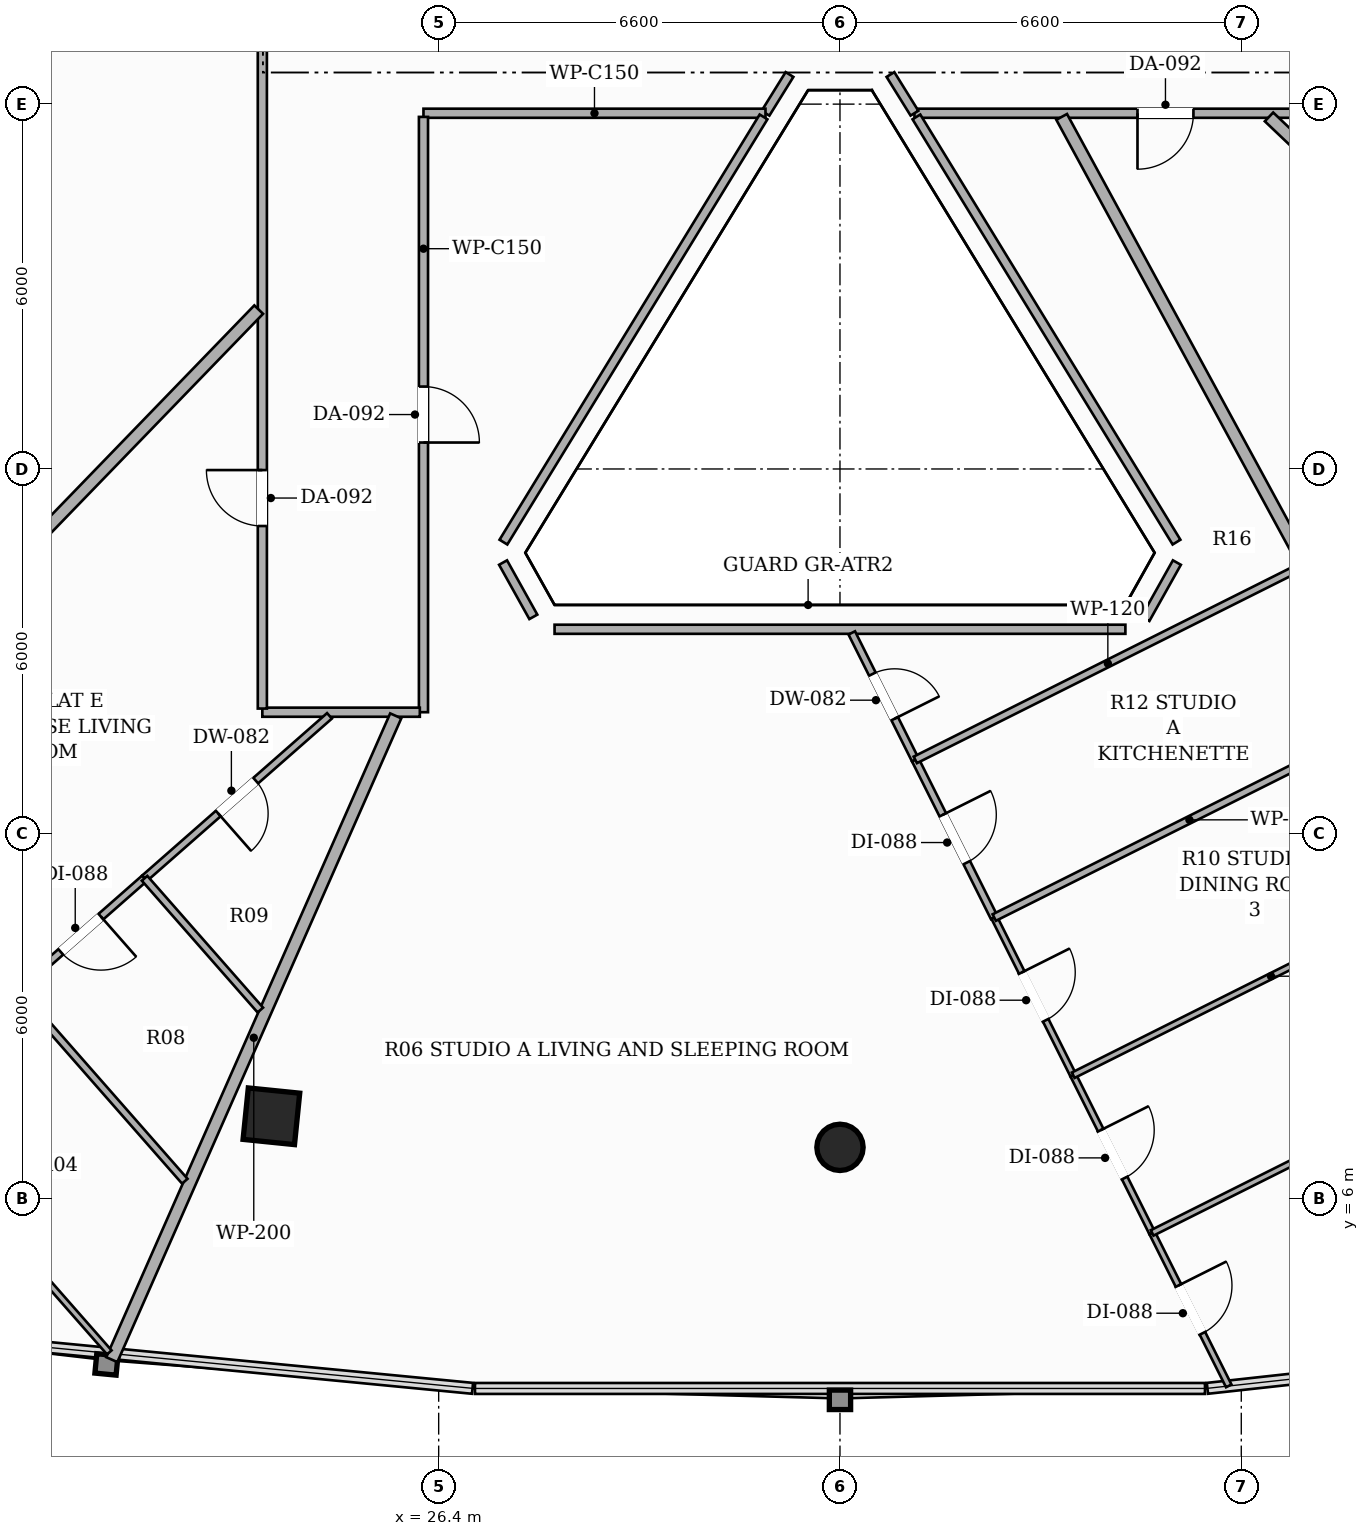
"""IFC4 building model, lengths in metres.
Left out: names, types, materials, properties, quantities, classifications, styles, units other than length and angle.
Written with IfcOpenShell. Run it as: python <this file> out.ifc"""

import sys

from ifc_helpers import new_model, si_unit, direction, frame, frame_2d, origin, origin_2d, place, context, subcontext, project, spatial, rectangle, hollow_rectangle, hollow_circle, extrude, element, fill, save


model = new_model("IFC4")
c1 = context("Model", 3, precision=1e-05, world=origin(), true_north=direction((0.0, 1.0)))
c2 = subcontext(c1, "Body", "Model", "MODEL_VIEW")
j1 = project(units=[si_unit("LENGTHUNIT", "METRE"), si_unit("PLANEANGLEUNIT", "RADIAN")], contexts=[c1])
p1 = place(None, origin())
s1 = spatial("IfcSite", under=j1, at=p1, CompositionType="ELEMENT")
p2 = place(p1, origin())
s2 = spatial("IfcBuilding", under=s1, at=p2, CompositionType="ELEMENT")
p3 = place(p2, frame((0.0, 0.0, 110.0)))
s3 = spatial("IfcBuildingStorey", under=s2, at=p3, CompositionType="ELEMENT", Elevation=110.0)
p4 = place(p3, frame((23.649, 7.355, 0.0), z_axis=(0.0, 0.0, 1.0), x_axis=(-0.994880708829, 0.101056297183, 0.0)))
e1 = element("IfcColumn", 1, at=p4, inside=s3, PredefinedType="COLUMN", context=c2, shape_type="SweptSolid", body=[
    extrude(hollow_rectangle(XDim=0.85, YDim=0.85, WallThickness=0.028, at=origin_2d()), origin(), (0.0, 0.0, 1.0), 3.3),
])
p5 = place(p3, frame((33.0, 6.844, 0.0), z_axis=(0.0, 0.0, 1.0), x_axis=(1.0, 0.0, 0.0)))
e2 = element("IfcColumn", 2, at=p5, inside=s3, PredefinedType="COLUMN", context=c2, shape_type="SweptSolid", body=[
    extrude(hollow_circle(Radius=0.381, WallThickness=0.022, at=origin_2d()), origin(), (0.0, 0.0, 1.0), 3.3),
])
p6 = place(p3, frame((20.095, 34.718, 0.0), z_axis=(0.0, 0.0, 1.0), x_axis=(-0.514362369366, -0.857572943242, 0.0)))
e3 = element("IfcWall", 3, at=p6, inside=s3, PredefinedType="SOLIDWALL", context=c2, shape_type="SweptSolid", body=[
    extrude(rectangle(XDim=11.844, YDim=0.24, at=frame_2d((5.922, 0.0))), origin(), (0.0, 0.0, 1.0), 2.624),
])
p7 = place(p6, frame((9.346, 0.0, 0.0)))
e4 = element("IfcOpeningElement", 4, at=p7, cuts=e3, PredefinedType="OPENING", context=c2, shape_type="SweptSolid", body=[
    extrude(rectangle(XDim=1.8, YDim=2.2, at=frame_2d((0.9, 1.1))), frame((0.0, 0.13, 0.0), z_axis=(0.0, -1.0, 0.0), x_axis=(1.0, 0.0, 0.0)), (0.0, 0.0, 1.0), 0.26),
])
p8 = place(p3, frame((32.17, 24.487, 0.0), z_axis=(0.0, 0.0, 1.0), x_axis=(-0.527038486816, -0.849841416627, 0.0)))
e5 = element("IfcWall", 5, at=p8, inside=s3, PredefinedType="PARTITIONING", context=c2, shape_type="SweptSolid", body=[
    extrude(rectangle(XDim=0.75, YDim=0.15, at=frame_2d((0.375, 0.0))), origin(), (0.0, 0.0, 1.0), 3.06),
])
p9 = place(p3, frame((31.775, 23.85, 0.0), z_axis=(0.0, 0.0, 1.0), x_axis=(-1.0, 0.0, 0.0)))
e6 = element("IfcWall", 6, at=p9, inside=s3, PredefinedType="PARTITIONING", context=c2, shape_type="SweptSolid", body=[
    extrude(rectangle(XDim=5.625, YDim=0.15, at=frame_2d((2.812, 0.0))), origin(), (0.0, 0.0, 1.0), 2.721),
])
p10 = place(p3, frame((26.15, 23.79, 0.0), z_axis=(0.0, 0.0, 1.0), x_axis=(0.0, -1.0, 0.0)))
e7 = element("IfcWall", 7, at=p10, inside=s3, PredefinedType="PARTITIONING", context=c2, shape_type="SweptSolid", body=[
    extrude(rectangle(XDim=9.79, YDim=0.15, at=frame_2d((4.895, 0.0))), origin(), (0.0, 0.0, 1.0), 2.721),
])
p11 = place(p10, frame((4.435, 0.0, 0.0)))
e8 = element("IfcOpeningElement", 8, at=p11, cuts=e7, PredefinedType="OPENING", context=c2, shape_type="SweptSolid", body=[
    extrude(rectangle(XDim=0.92, YDim=2.15, at=frame_2d((0.46, 1.075))), frame((0.0, 0.085, 0.0), z_axis=(0.0, -1.0, 0.0), x_axis=(1.0, 0.0, 0.0)), (0.0, 0.0, 1.0), 0.17),
])
p12 = place(p3, frame((26.09, 14.0, 0.0), z_axis=(0.0, 0.0, 1.0), x_axis=(-1.0, 0.0, 0.0)))
e9 = element("IfcWall", 9, at=p12, inside=s3, PredefinedType="PARTITIONING", context=c2, shape_type="SweptSolid", body=[
    extrude(rectangle(XDim=2.59, YDim=0.15, at=frame_2d((1.295, 0.0))), origin(), (0.0, 0.0, 1.0), 2.721),
])
p13 = place(p3, frame((23.5, 14.06, 0.0), z_axis=(0.0, 0.0, 1.0), x_axis=(0.0, 1.0, 0.0)))
e10 = element("IfcWall", 10, at=p13, inside=s3, PredefinedType="PARTITIONING", context=c2, shape_type="SweptSolid", body=[
    extrude(rectangle(XDim=22.84, YDim=0.15, at=frame_2d((11.42, 0.0))), origin(), (0.0, 0.0, 1.0), 2.413),
])
p14 = place(p13, frame((13.373, 0.0, 0.0)))
e11 = element("IfcOpeningElement", 11, at=p14, cuts=e10, PredefinedType="OPENING", context=c2, shape_type="SweptSolid", body=[
    extrude(rectangle(XDim=0.88, YDim=2.1, at=frame_2d((0.44, 1.05))), frame((0.0, 0.085, 0.0), z_axis=(0.0, -1.0, 0.0), x_axis=(1.0, 0.0, 0.0)), (0.0, 0.0, 1.0), 0.17),
])
p15 = place(p13, frame((3.002, 0.0, 0.0)))
e12 = element("IfcOpeningElement", 12, at=p15, cuts=e10, PredefinedType="OPENING", context=c2, shape_type="SweptSolid", body=[
    extrude(rectangle(XDim=0.92, YDim=2.15, at=frame_2d((0.46, 1.075))), frame((0.0, 0.085, 0.0), z_axis=(0.0, -1.0, 0.0), x_axis=(1.0, 0.0, 0.0)), (0.0, 0.0, 1.0), 0.17),
])
p16 = place(p3, frame((42.29, 23.85, 0.0), z_axis=(0.0, 0.0, 1.0), x_axis=(-1.0, 0.0, 0.0)))
e13 = element("IfcWall", 13, at=p16, inside=s3, PredefinedType="PARTITIONING", context=c2, shape_type="SweptSolid", body=[
    extrude(rectangle(XDim=8.065, YDim=0.15, at=frame_2d((4.032, 0.0))), origin(), (0.0, 0.0, 1.0), 2.492),
])
p17 = place(p16, frame((3.477, 0.0, 0.0)))
e14 = element("IfcOpeningElement", 14, at=p17, cuts=e13, PredefinedType="OPENING", context=c2, shape_type="SweptSolid", body=[
    extrude(rectangle(XDim=0.92, YDim=2.15, at=frame_2d((0.46, 1.075))), frame((0.0, 0.085, 0.0), z_axis=(0.0, -1.0, 0.0), x_axis=(1.0, 0.0, 0.0)), (0.0, 0.0, 1.0), 0.17),
])
p18 = place(p16, frame((0.14, 0.0, 0.0)))
e15 = element("IfcOpeningElement", 15, at=p18, cuts=e13, PredefinedType="OPENING", context=c2, shape_type="SweptSolid", body=[
    extrude(rectangle(XDim=0.88, YDim=2.1, at=frame_2d((0.44, 1.05))), frame((0.0, 0.085, 0.0), z_axis=(0.0, -1.0, 0.0), x_axis=(1.0, 0.0, 0.0)), (0.0, 0.0, 1.0), 0.17),
])
p19 = place(p3, frame((34.225, 23.851, 0.0), z_axis=(0.0, 0.0, 1.0), x_axis=(-0.527622593928, 0.849478898135, 0.0)))
e16 = element("IfcWall", 16, at=p19, inside=s3, PredefinedType="PARTITIONING", context=c2, shape_type="SweptSolid", body=[
    extrude(rectangle(XDim=0.749, YDim=0.15, at=frame_2d((0.375, 0.0))), origin(), (0.0, 0.0, 1.0), 3.06),
])
p20 = place(p3, frame((34.257, 23.79, 0.0), z_axis=(0.0, 0.0, 1.0), x_axis=(0.521839061235, -0.853043957935, 0.0)))
e17 = element("IfcWall", 17, at=p20, inside=s3, PredefinedType="PARTITIONING", context=c2, shape_type="SweptSolid", body=[
    extrude(rectangle(XDim=8.198, YDim=0.15, at=frame_2d((4.099, 0.0))), origin(), (0.0, 0.0, 1.0), 2.721),
])
p21 = place(p3, frame((38.541, 16.461, 0.0), z_axis=(0.0, 0.0, 1.0), x_axis=(-0.488631416095, -0.872490308946, 0.0)))
e18 = element("IfcWall", 18, at=p21, inside=s3, PredefinedType="PARTITIONING", context=c2, shape_type="SweptSolid", body=[
    extrude(rectangle(XDim=1.06, YDim=0.15, at=frame_2d((0.53, 0.0))), origin(), (0.0, 0.0, 1.0), 3.06),
])
p22 = place(p3, frame((37.694, 15.364, 0.0), z_axis=(0.0, 0.0, 1.0), x_axis=(-1.0, 0.0, 0.0)))
e19 = element("IfcWall", 19, at=p22, inside=s3, PredefinedType="PARTITIONING", context=c2, shape_type="SweptSolid", body=[
    extrude(rectangle(XDim=9.388, YDim=0.15, at=frame_2d((4.694, 0.0))), origin(), (0.0, 0.0, 1.0), 2.721),
])
p23 = place(p3, frame((27.957, 15.568, 0.0), z_axis=(0.0, 0.0, 1.0), x_axis=(-0.487162890713, 0.873311123204, 0.0)))
e20 = element("IfcWall", 20, at=p23, inside=s3, PredefinedType="PARTITIONING", context=c2, shape_type="SweptSolid", body=[
    extrude(rectangle(XDim=1.022, YDim=0.15, at=frame_2d((0.511, 0.0))), origin(), (0.0, 0.0, 1.0), 3.06),
])
p24 = place(p3, frame((27.465, 16.797, 0.0), z_axis=(0.0, 0.0, 1.0), x_axis=(0.521839061235, 0.853043957935, 0.0)))
e21 = element("IfcWall", 21, at=p24, inside=s3, PredefinedType="PARTITIONING", context=c2, shape_type="SweptSolid", body=[
    extrude(rectangle(XDim=8.198, YDim=0.15, at=frame_2d((4.099, 0.0))), origin(), (0.0, 0.0, 1.0), 2.721),
])
p25 = place(p3, frame((36.646, 23.79, 0.0), z_axis=(0.0, 0.0, 1.0), x_axis=(0.477391569207, -0.878690667784, 0.0)))
e22 = element("IfcWall", 22, at=p25, inside=s3, PredefinedType="PARTITIONING", context=c2, shape_type="SweptSolid", body=[
    extrude(rectangle(XDim=22.918, YDim=0.2, at=frame_2d((11.459, 0.0))), origin(), (0.0, 0.0, 1.0), 2.413),
])
p26 = place(p3, frame((21.024, 3.353, 0.0), z_axis=(0.0, 0.0, 1.0), x_axis=(0.403601766718, 0.914934759369, 0.0)))
e23 = element("IfcWall", 23, at=p26, inside=s3, PredefinedType="PARTITIONING", context=c2, shape_type="SweptSolid", body=[
    extrude(rectangle(XDim=11.571, YDim=0.2, at=frame_2d((5.786, 0.0))), origin(), (0.0, 0.0, 1.0), 2.413),
])
p27 = place(p3, frame((23.44, 20.621, 0.0), z_axis=(0.0, 0.0, 1.0), x_axis=(-0.695405261367, -0.718617786075, 0.0)))
e24 = element("IfcWall", 24, at=p27, inside=s3, PredefinedType="PARTITIONING", context=c2, shape_type="SweptSolid", body=[
    extrude(rectangle(XDim=21.635, YDim=0.2, at=frame_2d((10.817, 0.0))), origin(), (0.0, 0.0, 1.0), 2.413),
])
p28 = place(p3, frame((40.056, 23.79, 0.0), z_axis=(0.0, 0.0, 1.0), x_axis=(0.724633427165, -0.68913452695, 0.0)))
e25 = element("IfcWall", 25, at=p28, inside=s3, PredefinedType="PARTITIONING", context=c2, shape_type="SweptSolid", body=[
    extrude(rectangle(XDim=25.921, YDim=0.2, at=frame_2d((12.96, 0.0))), origin(), (0.0, 0.0, 1.0), 2.413),
])
p29 = place(p3, frame((33.194, 15.304, 0.0), z_axis=(0.0, 0.0, 1.0), x_axis=(0.447548179666, -0.894259820677, 0.0)))
e26 = element("IfcWall", 26, at=p29, inside=s3, PredefinedType="PARTITIONING", context=c2, shape_type="SweptSolid", body=[
    extrude(rectangle(XDim=2.335, YDim=0.12, at=frame_2d((1.167, 0.0))), origin(), (0.0, 0.0, 1.0), 2.721),
])
p30 = place(p29, frame((0.757, 0.0, 0.0)))
e27 = element("IfcOpeningElement", 27, at=p30, cuts=e26, PredefinedType="OPENING", context=c2, shape_type="SweptSolid", body=[
    extrude(rectangle(XDim=0.82, YDim=2.1, at=frame_2d((0.41, 1.05))), frame((0.0, 0.07, 0.0), z_axis=(0.0, -1.0, 0.0), x_axis=(1.0, 0.0, 0.0)), (0.0, 0.0, 1.0), 0.14),
])
p31 = place(p3, frame((34.239, 13.216, 0.0), z_axis=(0.0, 0.0, 1.0), x_axis=(0.447651342751, -0.894208183441, 0.0)))
e28 = element("IfcWall", 28, at=p31, inside=s3, PredefinedType="PARTITIONING", context=c2, shape_type="SweptSolid", body=[
    extrude(rectangle(XDim=2.9, YDim=0.12, at=frame_2d((1.45, 0.0))), origin(), (0.0, 0.0, 1.0), 3.06),
])
p32 = place(p31, frame((1.01, 0.0, 0.0)))
e29 = element("IfcOpeningElement", 29, at=p32, cuts=e28, PredefinedType="OPENING", context=c2, shape_type="SweptSolid", body=[
    extrude(rectangle(XDim=0.88, YDim=2.1, at=frame_2d((0.44, 1.05))), frame((0.0, 0.07, 0.0), z_axis=(0.0, -1.0, 0.0), x_axis=(1.0, 0.0, 0.0)), (0.0, 0.0, 1.0), 0.14),
])
p33 = place(p3, frame((38.134, 5.437, 0.0), z_axis=(0.0, 0.0, 1.0), x_axis=(0.447768773835, -0.894149386388, 0.0)))
e30 = element("IfcWall", 30, at=p33, inside=s3, PredefinedType="PARTITIONING", context=c2, shape_type="SweptSolid", body=[
    extrude(rectangle(XDim=2.814, YDim=0.1, at=frame_2d((1.407, 0.0))), origin(), (0.0, 0.0, 1.0), 3.06),
])
p34 = place(p33, frame((0.967, 0.0, 0.0)))
e31 = element("IfcOpeningElement", 31, at=p34, cuts=e30, PredefinedType="OPENING", context=c2, shape_type="SweptSolid", body=[
    extrude(rectangle(XDim=0.88, YDim=2.1, at=frame_2d((0.44, 1.05))), frame((0.0, 0.06, 0.0), z_axis=(0.0, -1.0, 0.0), x_axis=(1.0, 0.0, 0.0)), (0.0, 0.0, 1.0), 0.12),
])
p35 = place(p3, frame((36.836, 8.03, 0.0), z_axis=(0.0, 0.0, 1.0), x_axis=(0.447651342751, -0.894208183441, 0.0)))
e32 = element("IfcWall", 32, at=p35, inside=s3, PredefinedType="PARTITIONING", context=c2, shape_type="SweptSolid", body=[
    extrude(rectangle(XDim=2.9, YDim=0.1, at=frame_2d((1.45, 0.0))), origin(), (0.0, 0.0, 1.0), 2.413),
])
p36 = place(p35, frame((1.01, 0.0, 0.0)))
e33 = element("IfcOpeningElement", 33, at=p36, cuts=e32, PredefinedType="OPENING", context=c2, shape_type="SweptSolid", body=[
    extrude(rectangle(XDim=0.88, YDim=2.1, at=frame_2d((0.44, 1.05))), frame((0.0, 0.06, 0.0), z_axis=(0.0, -1.0, 0.0), x_axis=(1.0, 0.0, 0.0)), (0.0, 0.0, 1.0), 0.12),
])
p37 = place(p3, frame((35.537, 10.623, 0.0), z_axis=(0.0, 0.0, 1.0), x_axis=(0.447853271476, -0.894107066983, 0.0)))
e34 = element("IfcWall", 34, at=p37, inside=s3, PredefinedType="PARTITIONING", context=c2, shape_type="SweptSolid", body=[
    extrude(rectangle(XDim=2.9, YDim=0.1, at=frame_2d((1.45, 0.0))), origin(), (0.0, 0.0, 1.0), 3.06),
])
p38 = place(p37, frame((1.01, 0.0, 0.0)))
e35 = element("IfcOpeningElement", 35, at=p38, cuts=e34, PredefinedType="OPENING", context=c2, shape_type="SweptSolid", body=[
    extrude(rectangle(XDim=0.88, YDim=2.1, at=frame_2d((0.44, 1.05))), frame((0.0, 0.06, 0.0), z_axis=(0.0, -1.0, 0.0), x_axis=(1.0, 0.0, 0.0)), (0.0, 0.0, 1.0), 0.12),
])
p39 = place(p3, frame((40.572, 16.387, 0.0), z_axis=(0.0, 0.0, 1.0), x_axis=(-0.894178861749, -0.447709909653, 0.0)))
e36 = element("IfcWall", 36, at=p39, inside=s3, PredefinedType="PARTITIONING", context=c2, shape_type="SweptSolid", body=[
    extrude(rectangle(XDim=7.083, YDim=0.12, at=frame_2d((3.541, 0.0))), origin(), (0.0, 0.0, 1.0), 2.721),
])
p40 = place(p3, frame((41.957, 13.837, 0.0), z_axis=(0.0, 0.0, 1.0), x_axis=(-0.894209449688, -0.447648813344, 0.0)))
e37 = element("IfcWall", 37, at=p40, inside=s3, PredefinedType="PARTITIONING", context=c2, shape_type="SweptSolid", body=[
    extrude(rectangle(XDim=7.179, YDim=0.12, at=frame_2d((3.59, 0.0))), origin(), (0.0, 0.0, 1.0), 2.721),
])
p41 = place(p3, frame((38.134, 5.437, 0.0), z_axis=(0.0, 0.0, 1.0), x_axis=(0.894182030014, 0.447703581849, 0.0)))
e38 = element("IfcWall", 38, at=p41, inside=s3, PredefinedType="PARTITIONING", context=c2, shape_type="SweptSolid", body=[
    extrude(rectangle(XDim=7.373, YDim=0.1, at=frame_2d((3.687, 0.0))), origin(), (0.0, 0.0, 1.0), 2.413),
])
p42 = place(p3, frame((36.836, 8.03, 0.0), z_axis=(0.0, 0.0, 1.0), x_axis=(0.894205618721, 0.447656465884, 0.0)))
e39 = element("IfcWall", 39, at=p42, inside=s3, PredefinedType="PARTITIONING", context=c2, shape_type="SweptSolid", body=[
    extrude(rectangle(XDim=7.276, YDim=0.1, at=frame_2d((3.638, 0.0))), origin(), (0.0, 0.0, 1.0), 2.721),
])
p43 = place(p3, frame((24.604, 13.94, 0.0), z_axis=(0.0, 0.0, 1.0), x_axis=(-0.751349767919, -0.659904179595, 0.0)))
e40 = element("IfcWall", 40, at=p43, inside=s3, PredefinedType="PARTITIONING", context=c2, shape_type="SweptSolid", body=[
    extrude(rectangle(XDim=4.047, YDim=0.12, at=frame_2d((2.024, 0.0))), origin(), (0.0, 0.0, 1.0), 2.721),
])
p44 = place(p43, frame((1.614, 0.0, 0.0)))
e41 = element("IfcOpeningElement", 41, at=p44, cuts=e40, PredefinedType="OPENING", context=c2, shape_type="SweptSolid", body=[
    extrude(rectangle(XDim=0.82, YDim=2.1, at=frame_2d((0.41, 1.05))), frame((0.0, 0.07, 0.0), z_axis=(0.0, -1.0, 0.0), x_axis=(1.0, 0.0, 0.0)), (0.0, 0.0, 1.0), 0.14),
])
p45 = place(p3, frame((21.563, 11.269, 0.0), z_axis=(0.0, 0.0, 1.0), x_axis=(-0.751138604229, -0.660144527537, 0.0)))
e42 = element("IfcWall", 42, at=p45, inside=s3, PredefinedType="PARTITIONING", context=c2, shape_type="SweptSolid", body=[
    extrude(rectangle(XDim=2.79, YDim=0.12, at=frame_2d((1.395, 0.0))), origin(), (0.0, 0.0, 1.0), 2.721),
])
p46 = place(p45, frame((0.955, 0.0, 0.0)))
e43 = element("IfcOpeningElement", 43, at=p46, cuts=e42, PredefinedType="OPENING", context=c2, shape_type="SweptSolid", body=[
    extrude(rectangle(XDim=0.88, YDim=2.1, at=frame_2d((0.44, 1.05))), frame((0.0, 0.07, 0.0), z_axis=(0.0, -1.0, 0.0), x_axis=(1.0, 0.0, 0.0)), (0.0, 0.0, 1.0), 0.14),
])
p47 = place(p3, frame((23.467, 9.102, 0.0), z_axis=(0.0, 0.0, 1.0), x_axis=(-0.660061062947, 0.751211949573, 0.0)))
e44 = element("IfcWall", 44, at=p47, inside=s3, PredefinedType="PARTITIONING", context=c2, shape_type="SweptSolid", body=[
    extrude(rectangle(XDim=2.885, YDim=0.12, at=frame_2d((1.442, 0.0))), origin(), (0.0, 0.0, 1.0), 2.721),
])
p48 = place(p3, frame((22.225, 6.287, 0.0), z_axis=(0.0, 0.0, 1.0), x_axis=(-0.659946783628, 0.751312347016, 0.0)))
e45 = element("IfcWall", 45, at=p48, inside=s3, PredefinedType="PARTITIONING", context=c2, shape_type="SweptSolid", body=[
    extrude(rectangle(XDim=4.179, YDim=0.12, at=frame_2d((2.09, 0.0))), origin(), (0.0, 0.0, 1.0), 2.413),
])
p49 = place(p3, frame((17.37, 7.586, 0.0), z_axis=(0.0, 0.0, 1.0), x_axis=(0.659851528992, -0.751396007234, 0.0)))
e46 = element("IfcWall", 46, at=p49, inside=s3, PredefinedType="PARTITIONING", context=c2, shape_type="SweptSolid", body=[
    extrude(rectangle(XDim=5.475, YDim=0.1, at=frame_2d((2.738, 0.0))), origin(), (0.0, 0.0, 1.0), 2.413),
])
p50 = place(p11, origin())
e47 = element("IfcDoor", 47, at=p50, inside=s3, OperationType="SINGLE_SWING_RIGHT", PredefinedType="DOOR", context=c2, shape_type="SweptSolid", body=[
    extrude(rectangle(XDim=0.92, YDim=2.15, at=frame_2d((0.46, 1.075))), frame((0.0, 0.025, 0.0), z_axis=(0.0, -1.0, 0.0), x_axis=(1.0, 0.0, 0.0)), (0.0, 0.0, 1.0), 0.05),
])
fill(e8, e47)
p51 = place(p30, origin())
e48 = element("IfcDoor", 48, at=p51, inside=s3, OperationType="SINGLE_SWING_RIGHT", PredefinedType="DOOR", context=c2, shape_type="SweptSolid", body=[
    extrude(rectangle(XDim=0.82, YDim=2.1, at=frame_2d((0.41, 1.05))), frame((0.0, 0.025, 0.0), z_axis=(0.0, -1.0, 0.0), x_axis=(1.0, 0.0, 0.0)), (0.0, 0.0, 1.0), 0.05),
])
fill(e27, e48)
p52 = place(p32, origin())
e49 = element("IfcDoor", 49, at=p52, inside=s3, OperationType="SINGLE_SWING_LEFT", PredefinedType="DOOR", context=c2, shape_type="SweptSolid", body=[
    extrude(rectangle(XDim=0.88, YDim=2.1, at=frame_2d((0.44, 1.05))), frame((0.0, 0.025, 0.0), z_axis=(0.0, -1.0, 0.0), x_axis=(1.0, 0.0, 0.0)), (0.0, 0.0, 1.0), 0.05),
])
fill(e29, e49)
p53 = place(p34, origin())
e50 = element("IfcDoor", 50, at=p53, inside=s3, OperationType="SINGLE_SWING_LEFT", PredefinedType="DOOR", context=c2, shape_type="SweptSolid", body=[
    extrude(rectangle(XDim=0.88, YDim=2.1, at=frame_2d((0.44, 1.05))), frame((0.0, 0.025, 0.0), z_axis=(0.0, -1.0, 0.0), x_axis=(1.0, 0.0, 0.0)), (0.0, 0.0, 1.0), 0.05),
])
fill(e31, e50)
p54 = place(p36, origin())
e51 = element("IfcDoor", 51, at=p54, inside=s3, OperationType="SINGLE_SWING_LEFT", PredefinedType="DOOR", context=c2, shape_type="SweptSolid", body=[
    extrude(rectangle(XDim=0.88, YDim=2.1, at=frame_2d((0.44, 1.05))), frame((0.0, 0.025, 0.0), z_axis=(0.0, -1.0, 0.0), x_axis=(1.0, 0.0, 0.0)), (0.0, 0.0, 1.0), 0.05),
])
fill(e33, e51)
p55 = place(p38, origin())
e52 = element("IfcDoor", 52, at=p55, inside=s3, OperationType="SINGLE_SWING_LEFT", PredefinedType="DOOR", context=c2, shape_type="SweptSolid", body=[
    extrude(rectangle(XDim=0.88, YDim=2.1, at=frame_2d((0.44, 1.05))), frame((0.0, 0.025, 0.0), z_axis=(0.0, -1.0, 0.0), x_axis=(1.0, 0.0, 0.0)), (0.0, 0.0, 1.0), 0.05),
])
fill(e35, e52)
p56 = place(p17, origin())
e53 = element("IfcDoor", 53, at=p56, inside=s3, OperationType="SINGLE_SWING_RIGHT", PredefinedType="DOOR", context=c2, shape_type="SweptSolid", body=[
    extrude(rectangle(XDim=0.92, YDim=2.15, at=frame_2d((0.46, 1.075))), frame((0.0, 0.025, 0.0), z_axis=(0.0, -1.0, 0.0), x_axis=(1.0, 0.0, 0.0)), (0.0, 0.0, 1.0), 0.05),
])
fill(e14, e53)
p57 = place(p15, origin())
e54 = element("IfcDoor", 54, at=p57, inside=s3, OperationType="SINGLE_SWING_RIGHT", PredefinedType="DOOR", context=c2, shape_type="SweptSolid", body=[
    extrude(rectangle(XDim=0.92, YDim=2.15, at=frame_2d((0.46, 1.075))), frame((0.0, 0.025, 0.0), z_axis=(0.0, -1.0, 0.0), x_axis=(1.0, 0.0, 0.0)), (0.0, 0.0, 1.0), 0.05),
])
fill(e12, e54)
p58 = place(p44, origin())
e55 = element("IfcDoor", 55, at=p58, inside=s3, OperationType="SINGLE_SWING_RIGHT", PredefinedType="DOOR", context=c2, shape_type="SweptSolid", body=[
    extrude(rectangle(XDim=0.82, YDim=2.1, at=frame_2d((0.41, 1.05))), frame((0.0, 0.025, 0.0), z_axis=(0.0, -1.0, 0.0), x_axis=(1.0, 0.0, 0.0)), (0.0, 0.0, 1.0), 0.05),
])
fill(e41, e55)
p59 = place(p46, origin())
e56 = element("IfcDoor", 56, at=p59, inside=s3, OperationType="SINGLE_SWING_LEFT", PredefinedType="DOOR", context=c2, shape_type="SweptSolid", body=[
    extrude(rectangle(XDim=0.88, YDim=2.1, at=frame_2d((0.44, 1.05))), frame((0.0, 0.025, 0.0), z_axis=(0.0, -1.0, 0.0), x_axis=(1.0, 0.0, 0.0)), (0.0, 0.0, 1.0), 0.05),
])
fill(e43, e56)
save(model, sys.argv[1])
